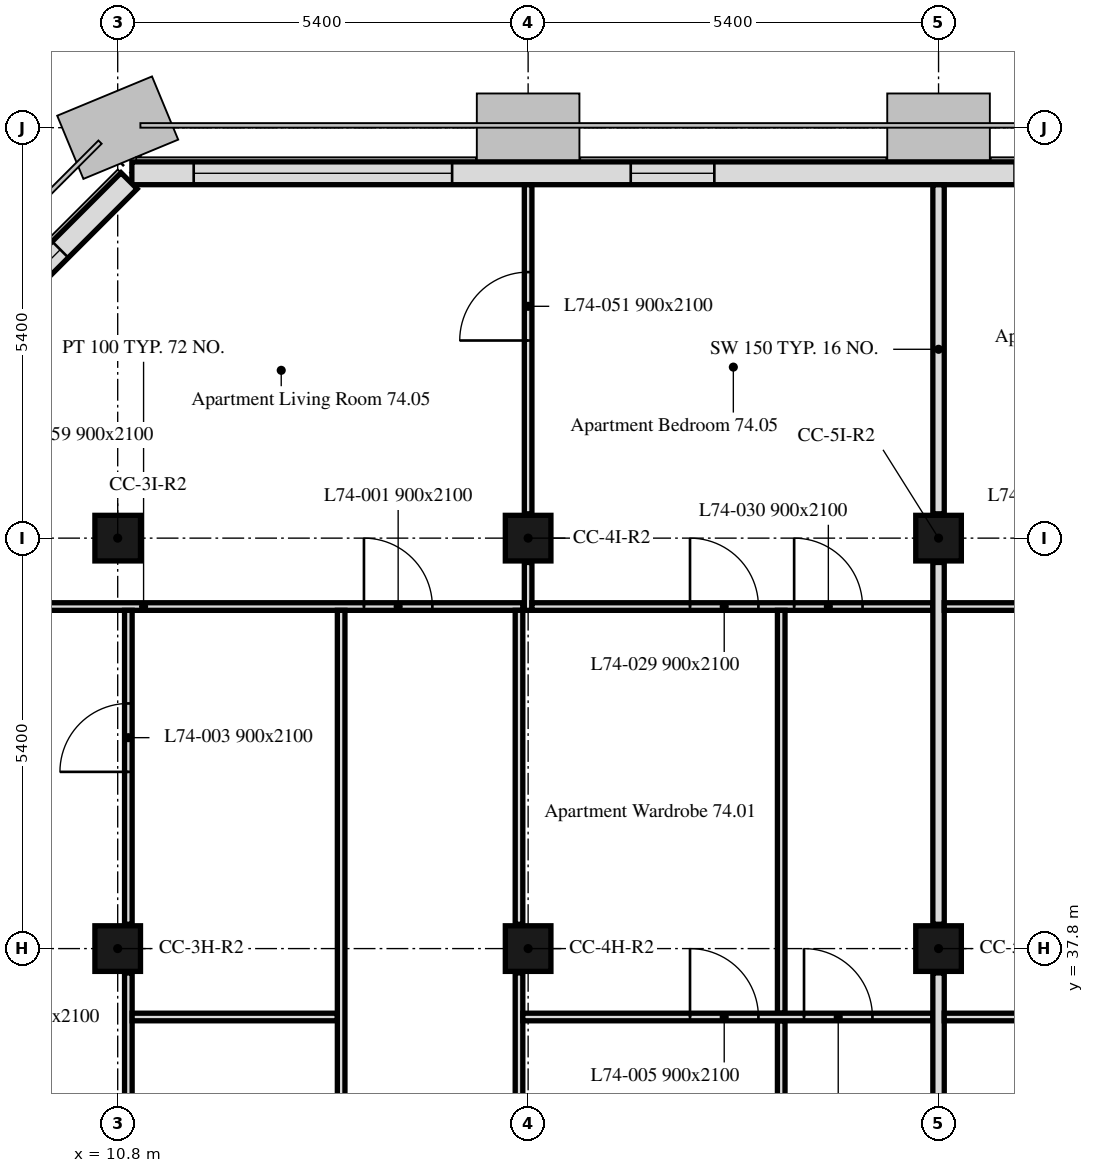
"""IFC4 building model, lengths in metres.
Left out: names, types, materials, properties, quantities, classifications, styles, units other than length and angle.
Written with IfcOpenShell. Run it as: python <this file> out.ifc"""

import sys

from ifc_helpers import new_model, si_unit, direction, frame, frame_2d, origin, origin_2d, place, context, subcontext, project, spatial, rectangle, extrude, element, fill, save


model = new_model("IFC4")
c1 = context("Model", 3, precision=1e-05, world=origin(), true_north=direction((0.0, 1.0)))
c2 = subcontext(c1, "Body", "Model", "MODEL_VIEW")
j1 = project(units=[si_unit("LENGTHUNIT", "METRE"), si_unit("PLANEANGLEUNIT", "RADIAN")], contexts=[c1])
p1 = place(None, origin())
s1 = spatial("IfcSite", under=j1, at=p1, CompositionType="ELEMENT")
p2 = place(p1, origin())
s2 = spatial("IfcBuilding", under=s1, at=p2, CompositionType="ELEMENT")
p3 = place(p2, frame((0.0, 0.0, 298.3)))
s3 = spatial("IfcBuildingStorey", under=s2, at=p3, CompositionType="ELEMENT", Elevation=298.3)
for number, where, z_axis, x_axis in (
    (1, (10.8, 37.8, 0.0), (0.0, 0.0, 1.0), (1.0, 0.0, 0.0)),
    (2, (16.2, 37.8, 0.0), (0.0, 0.0, 1.0), (1.0, 0.0, 0.0)),
    (3, (21.6, 37.8, 0.0), (0.0, 0.0, 1.0), (1.0, 0.0, 0.0)),
    (4, (10.8, 43.2, 0.0), (0.0, 0.0, 1.0), (1.0, 0.0, 0.0)),
    (5, (16.2, 43.2, 0.0), (0.0, 0.0, 1.0), (1.0, 0.0, 0.0)),
    (6, (21.6, 43.2, 0.0), (0.0, 0.0, 1.0), (1.0, 0.0, 0.0)),
):
    element("IfcColumn", number, at=place(p3, frame(where, z_axis=z_axis, x_axis=x_axis)), inside=s3, PredefinedType="COLUMN", context=c2, shape_type="SweptSolid", body=[
        extrude(rectangle(XDim=0.6, YDim=0.6, at=origin_2d()), origin(), (0.0, 0.0, 1.0), 3.0),
    ])
p4 = place(p3, frame((43.014, 48.0, 0.0), z_axis=(0.0, 0.0, 1.0), x_axis=(-1.0, 0.0, 0.0)))
e7 = element("IfcWall", 7, at=p4, inside=s3, PredefinedType="SOLIDWALL", context=c2, shape_type="SweptSolid", body=[
    extrude(rectangle(XDim=32.027, YDim=0.3, at=frame_2d((16.014, 0.0))), origin(), (0.0, 0.0, 1.0), 3.0),
])
p5 = place(p4, frame((2.764, 0.0, 0.9)))
e8 = element("IfcOpeningElement", 8, at=p5, cuts=e7, PredefinedType="OPENING", context=c2, shape_type="SweptSolid", body=[
    extrude(rectangle(XDim=1.1, YDim=1.7, at=frame_2d((0.55, 0.85))), frame((0.0, 0.16, 0.0), z_axis=(0.0, -1.0, 0.0), x_axis=(1.0, 0.0, 0.0)), (0.0, 0.0, 1.0), 0.32),
])
p6 = place(p4, frame((6.214, 0.0, 0.9)))
e9 = element("IfcOpeningElement", 9, at=p6, cuts=e7, PredefinedType="OPENING", context=c2, shape_type="SweptSolid", body=[
    extrude(rectangle(XDim=3.4, YDim=1.7, at=frame_2d((1.7, 0.85))), frame((0.0, 0.16, 0.0), z_axis=(0.0, -1.0, 0.0), x_axis=(1.0, 0.0, 0.0)), (0.0, 0.0, 1.0), 0.32),
])
p7 = place(p4, frame((13.564, 0.0, 0.9)))
e10 = element("IfcOpeningElement", 10, at=p7, cuts=e7, PredefinedType="OPENING", context=c2, shape_type="SweptSolid", body=[
    extrude(rectangle(XDim=1.1, YDim=1.7, at=frame_2d((0.55, 0.85))), frame((0.0, 0.16, 0.0), z_axis=(0.0, -1.0, 0.0), x_axis=(1.0, 0.0, 0.0)), (0.0, 0.0, 1.0), 0.32),
])
p8 = place(p4, frame((17.014, 0.0, 0.9)))
e11 = element("IfcOpeningElement", 11, at=p8, cuts=e7, PredefinedType="OPENING", context=c2, shape_type="SweptSolid", body=[
    extrude(rectangle(XDim=3.4, YDim=1.7, at=frame_2d((1.7, 0.85))), frame((0.0, 0.16, 0.0), z_axis=(0.0, -1.0, 0.0), x_axis=(1.0, 0.0, 0.0)), (0.0, 0.0, 1.0), 0.32),
])
p9 = place(p4, frame((24.364, 0.0, 0.9)))
e12 = element("IfcOpeningElement", 12, at=p9, cuts=e7, PredefinedType="OPENING", context=c2, shape_type="SweptSolid", body=[
    extrude(rectangle(XDim=1.1, YDim=1.7, at=frame_2d((0.55, 0.85))), frame((0.0, 0.16, 0.0), z_axis=(0.0, -1.0, 0.0), x_axis=(1.0, 0.0, 0.0)), (0.0, 0.0, 1.0), 0.32),
])
p10 = place(p4, frame((27.814, 0.0, 0.9)))
e13 = element("IfcOpeningElement", 13, at=p10, cuts=e7, PredefinedType="OPENING", context=c2, shape_type="SweptSolid", body=[
    extrude(rectangle(XDim=3.4, YDim=1.7, at=frame_2d((1.7, 0.85))), frame((0.0, 0.16, 0.0), z_axis=(0.0, -1.0, 0.0), x_axis=(1.0, 0.0, 0.0)), (0.0, 0.0, 1.0), 0.32),
])
p11 = place(p3, frame((10.949, 47.901, 0.0), z_axis=(0.0, 0.0, 1.0), x_axis=(-0.707106781187, -0.707106781187, 0.0)))
e14 = element("IfcWall", 14, at=p11, inside=s3, PredefinedType="SOLIDWALL", context=c2, shape_type="SweptSolid", body=[
    extrude(rectangle(XDim=6.86, YDim=0.3, at=frame_2d((3.43, 0.0))), origin(), (0.0, 0.0, 1.0), 3.0),
])
p12 = place(p11, frame((1.28, 0.0, 0.9)))
e15 = element("IfcOpeningElement", 15, at=p12, cuts=e14, PredefinedType="OPENING", context=c2, shape_type="SweptSolid", body=[
    extrude(rectangle(XDim=1.1, YDim=1.7, at=frame_2d((0.55, 0.85))), frame((0.0, 0.16, 0.0), z_axis=(0.0, -1.0, 0.0), x_axis=(1.0, 0.0, 0.0)), (0.0, 0.0, 1.0), 0.32),
])
p13 = place(p11, frame((4.48, 0.0, 0.9)))
e16 = element("IfcOpeningElement", 16, at=p13, cuts=e14, PredefinedType="OPENING", context=c2, shape_type="SweptSolid", body=[
    extrude(rectangle(XDim=1.1, YDim=1.7, at=frame_2d((0.55, 0.85))), frame((0.0, 0.16, 0.0), z_axis=(0.0, -1.0, 0.0), x_axis=(1.0, 0.0, 0.0)), (0.0, 0.0, 1.0), 0.32),
])
p14 = place(p3, frame((6.151, 42.3, 0.0), z_axis=(0.0, 0.0, 1.0), x_axis=(1.0, 0.0, 0.0)))
e17 = element("IfcWall", 17, at=p14, inside=s3, PredefinedType="PARTITIONING", context=c2, shape_type="SweptSolid", body=[
    extrude(rectangle(XDim=9.979, YDim=0.1, at=frame_2d((4.99, 0.0))), origin(), (0.0, 0.0, 1.0), 3.0),
])
p15 = place(p14, frame((7.889, 0.0, 0.0)))
e18 = element("IfcOpeningElement", 18, at=p15, cuts=e17, PredefinedType="OPENING", context=c2, shape_type="SweptSolid", body=[
    extrude(rectangle(XDim=0.9, YDim=2.1, at=frame_2d((0.45, 1.05))), frame((0.0, 0.05, 0.0), z_axis=(0.0, -1.0, 0.0), x_axis=(1.0, 0.0, 0.0)), (0.0, 0.0, 1.0), 0.1),
])
p16 = place(p14, frame((1.019, 0.0, 0.0)))
e19 = element("IfcOpeningElement", 19, at=p16, cuts=e17, PredefinedType="OPENING", context=c2, shape_type="SweptSolid", body=[
    extrude(rectangle(XDim=0.9, YDim=2.1, at=frame_2d((0.45, 1.05))), frame((0.0, 0.05, 0.0), z_axis=(0.0, -1.0, 0.0), x_axis=(1.0, 0.0, 0.0)), (0.0, 0.0, 1.0), 0.1),
])
p17 = place(p14, frame((2.389, 0.0, 0.0)))
e20 = element("IfcOpeningElement", 20, at=p17, cuts=e17, PredefinedType="OPENING", context=c2, shape_type="SweptSolid", body=[
    extrude(rectangle(XDim=0.9, YDim=2.1, at=frame_2d((0.45, 1.05))), frame((0.0, 0.05, 0.0), z_axis=(0.0, -1.0, 0.0), x_axis=(1.0, 0.0, 0.0)), (0.0, 0.0, 1.0), 0.1),
])
p18 = place(p3, frame((16.2, 42.25, 0.0), z_axis=(0.0, 0.0, 1.0), x_axis=(0.0, 1.0, 0.0)))
e21 = element("IfcWall", 21, at=p18, inside=s3, PredefinedType="PARTITIONING", context=c2, shape_type="SweptSolid", body=[
    extrude(rectangle(XDim=0.63, YDim=0.1, at=frame_2d((0.315, 0.0))), origin(), (0.0, 0.0, 1.0), 2.4),
])
p19 = place(p3, frame((16.2, 43.52, 0.0), z_axis=(0.0, 0.0, 1.0), x_axis=(0.0, 1.0, 0.0)))
e22 = element("IfcWall", 22, at=p19, inside=s3, PredefinedType="PARTITIONING", context=c2, shape_type="SweptSolid", body=[
    extrude(rectangle(XDim=4.329, YDim=0.1, at=frame_2d((2.165, 0.0))), origin(), (0.0, 0.0, 1.0), 2.4),
])
p20 = place(p19, frame((2.28, 0.0, 0.0)))
e23 = element("IfcOpeningElement", 23, at=p20, cuts=e22, PredefinedType="OPENING", context=c2, shape_type="SweptSolid", body=[
    extrude(rectangle(XDim=0.9, YDim=2.1, at=frame_2d((0.45, 1.05))), frame((0.0, 0.05, 0.0), z_axis=(0.0, -1.0, 0.0), x_axis=(1.0, 0.0, 0.0)), (0.0, 0.0, 1.0), 0.1),
])
p21 = place(p3, frame((16.25, 42.3, 0.0), z_axis=(0.0, 0.0, 1.0), x_axis=(1.0, 0.0, 0.0)))
e24 = element("IfcWall", 24, at=p21, inside=s3, PredefinedType="PARTITIONING", context=c2, shape_type="SweptSolid", body=[
    extrude(rectangle(XDim=5.275, YDim=0.1, at=frame_2d((2.637, 0.0))), origin(), (0.0, 0.0, 1.0), 3.0),
])
p22 = place(p21, frame((2.08, 0.0, 0.0)))
e25 = element("IfcOpeningElement", 25, at=p22, cuts=e24, PredefinedType="OPENING", context=c2, shape_type="SweptSolid", body=[
    extrude(rectangle(XDim=0.9, YDim=2.1, at=frame_2d((0.45, 1.05))), frame((0.0, 0.05, 0.0), z_axis=(0.0, -1.0, 0.0), x_axis=(1.0, 0.0, 0.0)), (0.0, 0.0, 1.0), 0.1),
])
p23 = place(p21, frame((3.45, 0.0, 0.0)))
e26 = element("IfcOpeningElement", 26, at=p23, cuts=e24, PredefinedType="OPENING", context=c2, shape_type="SweptSolid", body=[
    extrude(rectangle(XDim=0.9, YDim=2.1, at=frame_2d((0.45, 1.05))), frame((0.0, 0.05, 0.0), z_axis=(0.0, -1.0, 0.0), x_axis=(1.0, 0.0, 0.0)), (0.0, 0.0, 1.0), 0.1),
])
p24 = place(p3, frame((21.6, 43.52, 0.0), z_axis=(0.0, 0.0, 1.0), x_axis=(0.0, 1.0, 0.0)))
e27 = element("IfcWall", 27, at=p24, inside=s3, PredefinedType="PARTITIONING", context=c2, shape_type="SweptSolid", body=[
    extrude(rectangle(XDim=4.329, YDim=0.15, at=frame_2d((2.165, 0.0))), origin(), (0.0, 0.0, 1.0), 2.4),
])
p25 = place(p3, frame((10.94, 34.275, 0.0), z_axis=(0.0, 0.0, 1.0), x_axis=(0.0, 1.0, 0.0)))
e28 = element("IfcWall", 28, at=p25, inside=s3, PredefinedType="PARTITIONING", context=c2, shape_type="SweptSolid", body=[
    extrude(rectangle(XDim=3.205, YDim=0.1, at=frame_2d((1.603, 0.0))), origin(), (0.0, 0.0, 1.0), 3.0),
])
p26 = place(p25, frame((0.25, 0.0, 0.0)))
e29 = element("IfcOpeningElement", 29, at=p26, cuts=e28, PredefinedType="OPENING", context=c2, shape_type="SweptSolid", body=[
    extrude(rectangle(XDim=0.9, YDim=2.1, at=frame_2d((0.45, 1.05))), frame((0.0, 0.05, 0.0), z_axis=(0.0, -1.0, 0.0), x_axis=(1.0, 0.0, 0.0)), (0.0, 0.0, 1.0), 0.1),
])
p27 = place(p3, frame((10.94, 38.12, 0.0), z_axis=(0.0, 0.0, 1.0), x_axis=(0.0, 1.0, 0.0)))
e30 = element("IfcWall", 30, at=p27, inside=s3, PredefinedType="PARTITIONING", context=c2, shape_type="SweptSolid", body=[
    extrude(rectangle(XDim=4.13, YDim=0.1, at=frame_2d((2.065, 0.0))), origin(), (0.0, 0.0, 1.0), 3.0),
])
p28 = place(p27, frame((2.005, 0.0, 0.0)))
e31 = element("IfcOpeningElement", 31, at=p28, cuts=e30, PredefinedType="OPENING", context=c2, shape_type="SweptSolid", body=[
    extrude(rectangle(XDim=0.9, YDim=2.1, at=frame_2d((0.45, 1.05))), frame((0.0, 0.05, 0.0), z_axis=(0.0, -1.0, 0.0), x_axis=(1.0, 0.0, 0.0)), (0.0, 0.0, 1.0), 0.1),
])
p29 = place(p3, frame((10.99, 36.9, 0.0), z_axis=(0.0, 0.0, 1.0), x_axis=(1.0, 0.0, 0.0)))
e32 = element("IfcWall", 32, at=p29, inside=s3, PredefinedType="PARTITIONING", context=c2, shape_type="SweptSolid", body=[
    extrude(rectangle(XDim=2.7, YDim=0.1, at=frame_2d((1.35, 0.0))), origin(), (0.0, 0.0, 1.0), 3.0),
])
p30 = place(p3, frame((13.74, 34.275, 0.0), z_axis=(0.0, 0.0, 1.0), x_axis=(0.0, 1.0, 0.0)))
e33 = element("IfcWall", 33, at=p30, inside=s3, PredefinedType="PARTITIONING", context=c2, shape_type="SweptSolid", body=[
    extrude(rectangle(XDim=7.975, YDim=0.1, at=frame_2d((3.988, 0.0))), origin(), (0.0, 0.0, 1.0), 3.0),
])
p31 = place(p3, frame((16.08, 34.275, 0.0), z_axis=(0.0, 0.0, 1.0), x_axis=(0.0, 1.0, 0.0)))
e34 = element("IfcWall", 34, at=p31, inside=s3, PredefinedType="PARTITIONING", context=c2, shape_type="SweptSolid", body=[
    extrude(rectangle(XDim=3.205, YDim=0.1, at=frame_2d((1.603, 0.0))), origin(), (0.0, 0.0, 1.0), 2.4),
])
p32 = place(p3, frame((16.08, 38.12, 0.0), z_axis=(0.0, 0.0, 1.0), x_axis=(0.0, 1.0, 0.0)))
e35 = element("IfcWall", 35, at=p32, inside=s3, PredefinedType="PARTITIONING", context=c2, shape_type="SweptSolid", body=[
    extrude(rectangle(XDim=4.13, YDim=0.1, at=frame_2d((2.065, 0.0))), origin(), (0.0, 0.0, 1.0), 2.4),
])
p33 = place(p3, frame((19.53, 36.95, 0.0), z_axis=(0.0, 0.0, 1.0), x_axis=(0.0, 1.0, 0.0)))
e36 = element("IfcWall", 36, at=p33, inside=s3, PredefinedType="PARTITIONING", context=c2, shape_type="SweptSolid", body=[
    extrude(rectangle(XDim=5.3, YDim=0.1, at=frame_2d((2.65, 0.0))), origin(), (0.0, 0.0, 1.0), 3.0),
])
p34 = place(p3, frame((19.53, 34.275, 0.0), z_axis=(0.0, 0.0, 1.0), x_axis=(0.0, 1.0, 0.0)))
e37 = element("IfcWall", 37, at=p34, inside=s3, PredefinedType="PARTITIONING", context=c2, shape_type="SweptSolid", body=[
    extrude(rectangle(XDim=2.575, YDim=0.1, at=frame_2d((1.288, 0.0))), origin(), (0.0, 0.0, 1.0), 3.0),
])
p35 = place(p3, frame((16.13, 36.9, 0.0), z_axis=(0.0, 0.0, 1.0), x_axis=(1.0, 0.0, 0.0)))
e38 = element("IfcWall", 38, at=p35, inside=s3, PredefinedType="PARTITIONING", context=c2, shape_type="SweptSolid", body=[
    extrude(rectangle(XDim=5.395, YDim=0.1, at=frame_2d((2.698, 0.0))), origin(), (0.0, 0.0, 1.0), 3.0),
])
p36 = place(p35, frame((2.2, 0.0, 0.0)))
e39 = element("IfcOpeningElement", 39, at=p36, cuts=e38, PredefinedType="OPENING", context=c2, shape_type="SweptSolid", body=[
    extrude(rectangle(XDim=0.9, YDim=2.1, at=frame_2d((0.45, 1.05))), frame((0.0, 0.05, 0.0), z_axis=(0.0, -1.0, 0.0), x_axis=(1.0, 0.0, 0.0)), (0.0, 0.0, 1.0), 0.1),
])
p37 = place(p35, frame((3.7, 0.0, 0.0)))
e40 = element("IfcOpeningElement", 40, at=p37, cuts=e38, PredefinedType="OPENING", context=c2, shape_type="SweptSolid", body=[
    extrude(rectangle(XDim=0.9, YDim=2.1, at=frame_2d((0.45, 1.05))), frame((0.0, 0.05, 0.0), z_axis=(0.0, -1.0, 0.0), x_axis=(1.0, 0.0, 0.0)), (0.0, 0.0, 1.0), 0.1),
])
p38 = place(p3, frame((21.6, 38.12, 0.0), z_axis=(0.0, 0.0, 1.0), x_axis=(0.0, 1.0, 0.0)))
e41 = element("IfcWall", 41, at=p38, inside=s3, PredefinedType="PARTITIONING", context=c2, shape_type="SweptSolid", body=[
    extrude(rectangle(XDim=4.76, YDim=0.15, at=frame_2d((2.38, 0.0))), origin(), (0.0, 0.0, 1.0), 2.4),
])
p39 = place(p3, frame((21.6, 34.275, 0.0), z_axis=(0.0, 0.0, 1.0), x_axis=(0.0, 1.0, 0.0)))
e42 = element("IfcWall", 42, at=p39, inside=s3, PredefinedType="PARTITIONING", context=c2, shape_type="SweptSolid", body=[
    extrude(rectangle(XDim=3.205, YDim=0.15, at=frame_2d((1.603, 0.0))), origin(), (0.0, 0.0, 1.0), 2.4),
])
p40 = place(p3, frame((21.675, 42.3, 0.0), z_axis=(0.0, 0.0, 1.0), x_axis=(1.0, 0.0, 0.0)))
e43 = element("IfcWall", 43, at=p40, inside=s3, PredefinedType="PARTITIONING", context=c2, shape_type="SweptSolid", body=[
    extrude(rectangle(XDim=5.097, YDim=0.1, at=frame_2d((2.548, 0.0))), origin(), (0.0, 0.0, 1.0), 3.0),
])
p41 = place(p40, frame((1.097, 0.0, 0.0)))
e44 = element("IfcOpeningElement", 44, at=p41, cuts=e43, PredefinedType="OPENING", context=c2, shape_type="SweptSolid", body=[
    extrude(rectangle(XDim=0.9, YDim=2.1, at=frame_2d((0.45, 1.05))), frame((0.0, 0.05, 0.0), z_axis=(0.0, -1.0, 0.0), x_axis=(1.0, 0.0, 0.0)), (0.0, 0.0, 1.0), 0.1),
])
p42 = place(p40, frame((2.597, 0.0, 0.0)))
e45 = element("IfcOpeningElement", 45, at=p42, cuts=e43, PredefinedType="OPENING", context=c2, shape_type="SweptSolid", body=[
    extrude(rectangle(XDim=0.9, YDim=2.1, at=frame_2d((0.45, 1.05))), frame((0.0, 0.05, 0.0), z_axis=(0.0, -1.0, 0.0), x_axis=(1.0, 0.0, 0.0)), (0.0, 0.0, 1.0), 0.1),
])
p43 = place(p3, frame((21.675, 36.9, 0.0), z_axis=(0.0, 0.0, 1.0), x_axis=(1.0, 0.0, 0.0)))
e46 = element("IfcWall", 46, at=p43, inside=s3, PredefinedType="PARTITIONING", context=c2, shape_type="SweptSolid", body=[
    extrude(rectangle(XDim=2.247, YDim=0.1, at=frame_2d((1.124, 0.0))), origin(), (0.0, 0.0, 1.0), 3.0),
])
p44 = place(p9, origin())
e47 = element("IfcWindow", 47, at=p44, inside=s3, PartitioningType="SINGLE_PANEL", PredefinedType="WINDOW", context=c2, shape_type="SweptSolid", body=[
    extrude(rectangle(XDim=1.1, YDim=1.7, at=frame_2d((0.55, 0.85))), frame((0.0, 0.03, 0.0), z_axis=(0.0, -1.0, 0.0), x_axis=(1.0, 0.0, 0.0)), (0.0, 0.0, 1.0), 0.06),
])
fill(e12, e47)
p45 = place(p10, origin())
e48 = element("IfcWindow", 48, at=p45, inside=s3, PartitioningType="SINGLE_PANEL", PredefinedType="WINDOW", context=c2, shape_type="SweptSolid", body=[
    extrude(rectangle(XDim=3.4, YDim=1.7, at=frame_2d((1.7, 0.85))), frame((0.0, 0.03, 0.0), z_axis=(0.0, -1.0, 0.0), x_axis=(1.0, 0.0, 0.0)), (0.0, 0.0, 1.0), 0.06),
])
fill(e13, e48)
p46 = place(p12, origin())
e49 = element("IfcWindow", 49, at=p46, inside=s3, PartitioningType="SINGLE_PANEL", PredefinedType="WINDOW", context=c2, shape_type="SweptSolid", body=[
    extrude(rectangle(XDim=1.1, YDim=1.7, at=frame_2d((0.55, 0.85))), frame((0.0, 0.03, 0.0), z_axis=(0.0, -1.0, 0.0), x_axis=(1.0, 0.0, 0.0)), (0.0, 0.0, 1.0), 0.06),
])
fill(e15, e49)
p47 = place(p15, origin())
e50 = element("IfcDoor", 50, at=p47, inside=s3, OperationType="SINGLE_SWING_LEFT", PredefinedType="DOOR", context=c2, shape_type="SweptSolid", body=[
    extrude(rectangle(XDim=0.9, YDim=2.1, at=frame_2d((0.45, 1.05))), frame((0.0, 0.025, 0.0), z_axis=(0.0, -1.0, 0.0), x_axis=(1.0, 0.0, 0.0)), (0.0, 0.0, 1.0), 0.05),
])
fill(e18, e50)
p48 = place(p28, origin())
e51 = element("IfcDoor", 51, at=p48, inside=s3, OperationType="SINGLE_SWING_RIGHT", PredefinedType="DOOR", context=c2, shape_type="SweptSolid", body=[
    extrude(rectangle(XDim=0.9, YDim=2.1, at=frame_2d((0.45, 1.05))), frame((0.0, 0.025, 0.0), z_axis=(0.0, -1.0, 0.0), x_axis=(1.0, 0.0, 0.0)), (0.0, 0.0, 1.0), 0.05),
])
fill(e31, e51)
p49 = place(p36, origin())
e52 = element("IfcDoor", 52, at=p49, inside=s3, OperationType="SINGLE_SWING_LEFT", PredefinedType="DOOR", context=c2, shape_type="SweptSolid", body=[
    extrude(rectangle(XDim=0.9, YDim=2.1, at=frame_2d((0.45, 1.05))), frame((0.0, 0.025, 0.0), z_axis=(0.0, -1.0, 0.0), x_axis=(1.0, 0.0, 0.0)), (0.0, 0.0, 1.0), 0.05),
])
fill(e39, e52)
p50 = place(p37, origin())
e53 = element("IfcDoor", 53, at=p50, inside=s3, OperationType="SINGLE_SWING_LEFT", PredefinedType="DOOR", context=c2, shape_type="SweptSolid", body=[
    extrude(rectangle(XDim=0.9, YDim=2.1, at=frame_2d((0.45, 1.05))), frame((0.0, 0.025, 0.0), z_axis=(0.0, -1.0, 0.0), x_axis=(1.0, 0.0, 0.0)), (0.0, 0.0, 1.0), 0.05),
])
fill(e40, e53)
p51 = place(p22, origin())
e54 = element("IfcDoor", 54, at=p51, inside=s3, OperationType="SINGLE_SWING_RIGHT", PredefinedType="DOOR", context=c2, shape_type="SweptSolid", body=[
    extrude(rectangle(XDim=0.9, YDim=2.1, at=frame_2d((0.45, 1.05))), frame((0.0, 0.025, 0.0), z_axis=(0.0, -1.0, 0.0), x_axis=(1.0, 0.0, 0.0)), (0.0, 0.0, 1.0), 0.05),
])
fill(e25, e54)
p52 = place(p23, origin())
e55 = element("IfcDoor", 55, at=p52, inside=s3, OperationType="SINGLE_SWING_LEFT", PredefinedType="DOOR", context=c2, shape_type="SweptSolid", body=[
    extrude(rectangle(XDim=0.9, YDim=2.1, at=frame_2d((0.45, 1.05))), frame((0.0, 0.025, 0.0), z_axis=(0.0, -1.0, 0.0), x_axis=(1.0, 0.0, 0.0)), (0.0, 0.0, 1.0), 0.05),
])
fill(e26, e55)
p53 = place(p20, origin())
e56 = element("IfcDoor", 56, at=p53, inside=s3, OperationType="SINGLE_SWING_RIGHT", PredefinedType="DOOR", context=c2, shape_type="SweptSolid", body=[
    extrude(rectangle(XDim=0.9, YDim=2.1, at=frame_2d((0.45, 1.05))), frame((0.0, 0.025, 0.0), z_axis=(0.0, -1.0, 0.0), x_axis=(1.0, 0.0, 0.0)), (0.0, 0.0, 1.0), 0.05),
])
fill(e23, e56)
save(model, sys.argv[1])
